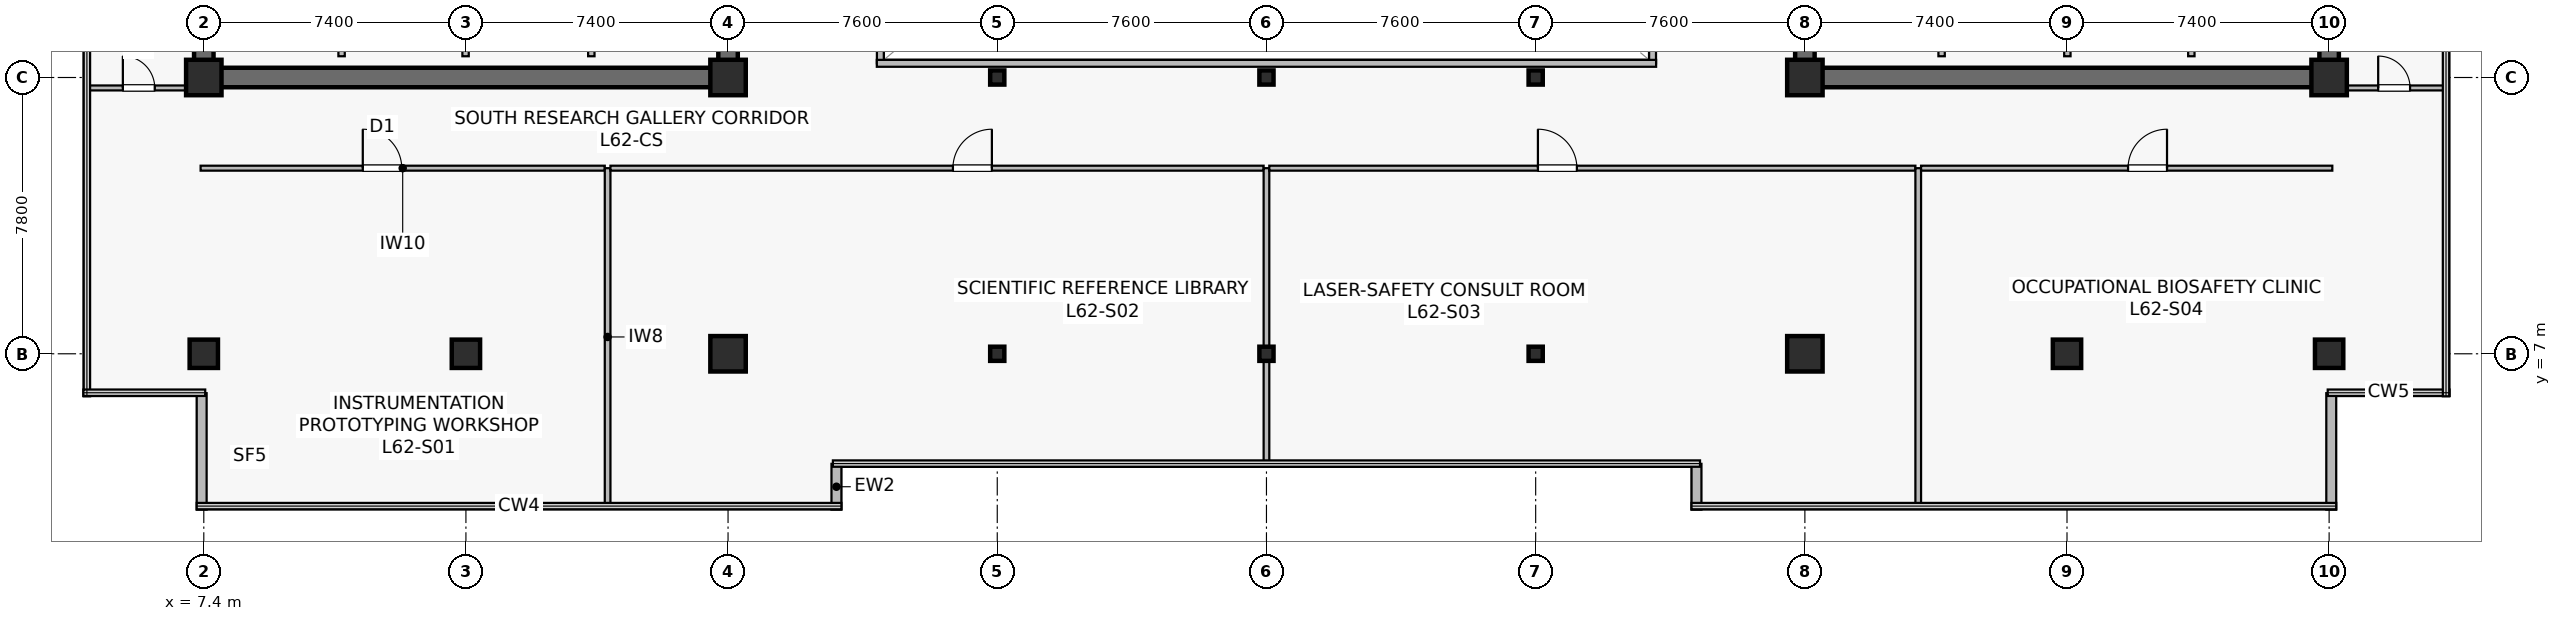
"""IFC4 building model, lengths in metres.
Left out: names, types, materials, properties, quantities, classifications, styles, units other than length and angle.
Written with IfcOpenShell. Run it as: python <this file> out.ifc"""

import sys

from ifc_helpers import new_model, si_unit, direction, frame, frame_2d, origin, origin_2d, place, context, subcontext, project, spatial, rectangle, hollow_rectangle, extrude, source, transform, mapped, element, fill, save


model = new_model("IFC4")
c1 = context("Model", 3, precision=1e-05, world=origin(), true_north=direction((0.0, 1.0)))
c2 = subcontext(c1, "Body", "Model", "MODEL_VIEW")
j1 = project(units=[si_unit("LENGTHUNIT", "METRE"), si_unit("PLANEANGLEUNIT", "RADIAN")], contexts=[c1])
p1 = place(None, origin())
s1 = spatial("IfcSite", under=j1, at=p1, CompositionType="ELEMENT")
p2 = place(p1, origin())
s2 = spatial("IfcBuilding", under=s1, at=p2, CompositionType="ELEMENT")
p3 = place(p2, frame((0.0, 0.0, 258.8)))
s3 = spatial("IfcBuildingStorey", under=s2, at=p3, CompositionType="ELEMENT", Elevation=258.8)
p4 = place(p3, frame((7.125, 14.8, 0.0), z_axis=(0.0, 0.0, 1.0), x_axis=(1.0, 0.0, 0.0)))
e1 = element("IfcWall", 1, at=p4, inside=s3, PredefinedType="SHEAR", context=c2, shape_type="SweptSolid", body=[
    extrude(rectangle(XDim=15.35, YDim=0.55, at=frame_2d((7.675, 0.0))), origin(), (0.0, 0.0, 1.0), 3.8),
])
p5 = place(p3, frame((7.4, 15.075, 0.0), z_axis=(0.0, 0.0, 1.0), x_axis=(0.0, 1.0, 0.0)))
e2 = element("IfcWall", 2, at=p5, inside=s3, PredefinedType="SHEAR", context=c2, shape_type="SweptSolid", body=[
    extrude(rectangle(XDim=18.45, YDim=0.55, at=frame_2d((9.225, 0.0))), origin(), (0.0, 0.0, 1.0), 3.8),
])
p6 = place(p3, frame((22.2, 15.075, 0.0), z_axis=(0.0, 0.0, 1.0), x_axis=(0.0, 1.0, 0.0)))
e3 = element("IfcWall", 3, at=p6, inside=s3, PredefinedType="SHEAR", context=c2, shape_type="SweptSolid", body=[
    extrude(rectangle(XDim=18.45, YDim=0.55, at=frame_2d((9.225, 0.0))), origin(), (0.0, 0.0, 1.0), 3.8),
])
p7 = place(p6, frame((3.475, 0.0, 0.0)))
e4 = element("IfcOpeningElement", 4, at=p7, cuts=e3, PredefinedType="OPENING", context=c2, shape_type="SweptSolid", body=[
    extrude(rectangle(XDim=1.42, YDim=2.2, at=frame_2d((0.71, 1.1))), frame((0.0, 0.285, 0.0), z_axis=(0.0, -1.0, 0.0), x_axis=(1.0, 0.0, 0.0)), (0.0, 0.0, 1.0), 0.57),
])
p8 = place(p3, frame((52.325, 14.8, 0.0), z_axis=(0.0, 0.0, 1.0), x_axis=(1.0, 0.0, 0.0)))
e5 = element("IfcWall", 5, at=p8, inside=s3, PredefinedType="SHEAR", context=c2, shape_type="SweptSolid", body=[
    extrude(rectangle(XDim=15.35, YDim=0.55, at=frame_2d((7.675, 0.0))), origin(), (0.0, 0.0, 1.0), 3.8),
])
p9 = place(p3, frame((52.6, 15.075, 0.0), z_axis=(0.0, 0.0, 1.0), x_axis=(0.0, 1.0, 0.0)))
e6 = element("IfcWall", 6, at=p9, inside=s3, PredefinedType="SHEAR", context=c2, shape_type="SweptSolid", body=[
    extrude(rectangle(XDim=18.45, YDim=0.55, at=frame_2d((9.225, 0.0))), origin(), (0.0, 0.0, 1.0), 3.8),
])
p10 = place(p9, frame((3.475, 0.0, 0.0)))
e7 = element("IfcOpeningElement", 7, at=p10, cuts=e6, PredefinedType="OPENING", context=c2, shape_type="SweptSolid", body=[
    extrude(rectangle(XDim=1.42, YDim=2.2, at=frame_2d((0.71, 1.1))), frame((0.0, 0.285, 0.0), z_axis=(0.0, -1.0, 0.0), x_axis=(1.0, 0.0, 0.0)), (0.0, 0.0, 1.0), 0.57),
])
p11 = place(p3, frame((67.4, 15.075, 0.0), z_axis=(0.0, 0.0, 1.0), x_axis=(0.0, 1.0, 0.0)))
e8 = element("IfcWall", 8, at=p11, inside=s3, PredefinedType="SHEAR", context=c2, shape_type="SweptSolid", body=[
    extrude(rectangle(XDim=18.45, YDim=0.55, at=frame_2d((9.225, 0.0))), origin(), (0.0, 0.0, 1.0), 3.8),
])
m1 = source(origin(), c2, "Body", "SweptSolid", [
    extrude(rectangle(XDim=0.8, YDim=0.8, at=origin_2d()), origin(), (0.0, 0.0, 1.0), 4.1),
])
p12 = place(p3, frame((14.8, 7.0, 0.0), z_axis=(0.0, 0.0, 1.0), x_axis=(1.0, 0.0, 0.0)))
e9 = element("IfcColumn", 9, at=p12, inside=s3, PredefinedType="COLUMN", context=c2, shape_type="MappedRepresentation", body=[
    mapped(m1, transform((0.0, 0.0, 0.0), scale=1.0)),
])
m2 = source(origin(), c2, "Body", "SweptSolid", [
    extrude(rectangle(XDim=1.0, YDim=1.0, at=origin_2d()), origin(), (0.0, 0.0, 1.0), 4.1),
])
for number, where, z_axis, x_axis in (
    (10, (22.2, 7.0, 0.0), (0.0, 0.0, 1.0), (1.0, 0.0, 0.0)),
    (11, (7.4, 14.8, 0.0), (0.0, 0.0, 1.0), (1.0, 0.0, 0.0)),
    (12, (22.2, 14.8, 0.0), (0.0, 0.0, 1.0), (1.0, 0.0, 0.0)),
    (13, (52.6, 7.0, 0.0), (0.0, 0.0, 1.0), (1.0, 0.0, 0.0)),
):
    element("IfcColumn", number, at=place(p3, frame(where, z_axis=z_axis, x_axis=x_axis)), inside=s3, PredefinedType="COLUMN", context=c2, shape_type="MappedRepresentation", body=[
        mapped(m2, transform((0.0, 0.0, 0.0), scale=1.0)),
    ])
p13 = place(p3, frame((60.0, 7.0, 0.0), z_axis=(0.0, 0.0, 1.0), x_axis=(1.0, 0.0, 0.0)))
e14 = element("IfcColumn", 14, at=p13, inside=s3, PredefinedType="COLUMN", context=c2, shape_type="MappedRepresentation", body=[
    mapped(m1, transform((0.0, 0.0, 0.0), scale=1.0)),
])
for number, where, z_axis, x_axis in (
    (15, (52.6, 14.8, 0.0), (0.0, 0.0, 1.0), (1.0, 0.0, 0.0)),
    (16, (67.4, 14.8, 0.0), (0.0, 0.0, 1.0), (1.0, 0.0, 0.0)),
):
    element("IfcColumn", number, at=place(p3, frame(where, z_axis=z_axis, x_axis=x_axis)), inside=s3, PredefinedType="COLUMN", context=c2, shape_type="MappedRepresentation", body=[
        mapped(m2, transform((0.0, 0.0, 0.0), scale=1.0)),
    ])
for number, where, z_axis, x_axis in (
    (17, (7.4, 7.0, 0.0), (0.0, 0.0, 1.0), (1.0, 0.0, 0.0)),
    (18, (67.4, 7.0, 0.0), (0.0, 0.0, 1.0), (1.0, 0.0, 0.0)),
):
    element("IfcColumn", number, at=place(p3, frame(where, z_axis=z_axis, x_axis=x_axis)), inside=s3, PredefinedType="COLUMN", context=c2, shape_type="MappedRepresentation", body=[
        mapped(m1, transform((0.0, 0.0, 0.0), scale=1.0)),
    ])
m3 = source(origin(), c2, "Body", "SweptSolid", [
    extrude(hollow_rectangle(XDim=0.4, YDim=0.4, WallThickness=0.019, at=origin_2d()), origin(), (0.0, 0.0, 1.0), 4.1),
])
for number, where, z_axis, x_axis in (
    (19, (29.8, 7.0, 0.0), (0.0, 0.0, 1.0), (1.0, 0.0, 0.0)),
    (20, (29.8, 14.8, 0.0), (0.0, 0.0, 1.0), (1.0, 0.0, 0.0)),
    (21, (37.4, 7.0, 0.0), (0.0, 0.0, 1.0), (1.0, 0.0, 0.0)),
    (22, (37.4, 14.8, 0.0), (0.0, 0.0, 1.0), (1.0, 0.0, 0.0)),
    (23, (45.0, 7.0, 0.0), (0.0, 0.0, 1.0), (1.0, 0.0, 0.0)),
    (24, (45.0, 14.8, 0.0), (0.0, 0.0, 1.0), (1.0, 0.0, 0.0)),
):
    element("IfcColumn", number, at=place(p3, frame(where, z_axis=z_axis, x_axis=x_axis)), inside=s3, PredefinedType="COLUMN", context=c2, shape_type="MappedRepresentation", body=[
        mapped(m3, transform((0.0, 0.0, 0.0), scale=1.0)),
    ])
for number, where, z_axis, x_axis in (
    (25, (25.26, 2.6, 0.0), (0.0, 0.0, 1.0), (0.0, 1.0, 0.0)),
    (26, (49.54, 3.893, 0.0), (0.0, 0.0, 1.0), (0.0, -1.0, 0.0)),
):
    element("IfcWall", number, at=place(p3, frame(where, z_axis=z_axis, x_axis=x_axis)), inside=s3, PredefinedType="STANDARD", context=c2, shape_type="SweptSolid", body=[
        extrude(rectangle(XDim=1.293, YDim=0.28, at=frame_2d((0.646, 0.0))), origin(), (0.0, 0.0, 1.0), 3.8),
    ])
for number, where, z_axis, x_axis in (
    (27, (67.46, 2.6, 0.0), (0.0, 0.0, 1.0), (0.0, 1.0, 0.0)),
    (28, (7.34, 5.888, 0.0), (0.0, 0.0, 1.0), (0.0, -1.0, 0.0)),
):
    element("IfcWall", number, at=place(p3, frame(where, z_axis=z_axis, x_axis=x_axis)), inside=s3, PredefinedType="STANDARD", context=c2, shape_type="SweptSolid", body=[
        extrude(rectangle(XDim=3.288, YDim=0.28, at=frame_2d((1.644, 0.0))), origin(), (0.0, 0.0, 1.0), 3.8),
    ])
p14 = place(p3, frame((11.29, 15.4, 0.0), z_axis=(0.0, 0.0, 1.0), x_axis=(0.0, 1.0, 0.0)))
e29 = element("IfcWall", 29, at=p14, inside=s3, PredefinedType="SOLIDWALL", context=c2, shape_type="SweptSolid", body=[
    extrude(rectangle(XDim=2.4, YDim=0.18, at=frame_2d((1.2, 0.0))), origin(), (0.0, 0.0, 1.0), 3.8),
])
p15 = place(p3, frame((14.79, 15.4, 0.0), z_axis=(0.0, 0.0, 1.0), x_axis=(0.0, 1.0, 0.0)))
e30 = element("IfcWall", 30, at=p15, inside=s3, PredefinedType="SOLIDWALL", context=c2, shape_type="SweptSolid", body=[
    extrude(rectangle(XDim=2.4, YDim=0.18, at=frame_2d((1.2, 0.0))), origin(), (0.0, 0.0, 1.0), 3.197),
])
for number, where, z_axis, x_axis in (
    (31, (18.34, 15.4, 0.0), (0.0, 0.0, 1.0), (0.0, 1.0, 0.0)),
    (32, (63.51, 15.4, 0.0), (0.0, 0.0, 1.0), (0.0, 1.0, 0.0)),
):
    element("IfcWall", number, at=place(p3, frame(where, z_axis=z_axis, x_axis=x_axis)), inside=s3, PredefinedType="SOLIDWALL", context=c2, shape_type="SweptSolid", body=[
        extrude(rectangle(XDim=2.4, YDim=0.18, at=frame_2d((1.2, 0.0))), origin(), (0.0, 0.0, 1.0), 3.8),
    ])
p16 = place(p3, frame((60.01, 15.4, 0.0), z_axis=(0.0, 0.0, 1.0), x_axis=(0.0, 1.0, 0.0)))
e33 = element("IfcWall", 33, at=p16, inside=s3, PredefinedType="SOLIDWALL", context=c2, shape_type="SweptSolid", body=[
    extrude(rectangle(XDim=2.4, YDim=0.18, at=frame_2d((1.2, 0.0))), origin(), (0.0, 0.0, 1.0), 3.197),
])
p17 = place(p3, frame((56.46, 15.4, 0.0), z_axis=(0.0, 0.0, 1.0), x_axis=(0.0, 1.0, 0.0)))
e34 = element("IfcWall", 34, at=p17, inside=s3, PredefinedType="SOLIDWALL", context=c2, shape_type="SweptSolid", body=[
    extrude(rectangle(XDim=2.4, YDim=0.18, at=frame_2d((1.2, 0.0))), origin(), (0.0, 0.0, 1.0), 3.8),
])
p18 = place(p3, frame((26.5, 15.2, 0.0), z_axis=(0.0, 0.0, 1.0), x_axis=(0.0, 1.0, 0.0)))
e35 = element("IfcWall", 35, at=p18, inside=s3, PredefinedType="SOLIDWALL", context=c2, shape_type="SweptSolid", body=[
    extrude(rectangle(XDim=18.2, YDim=0.195, at=frame_2d((9.1, 0.0))), origin(), (0.0, 0.0, 1.0), 3.8),
])
p19 = place(p18, frame((1.8, 0.0, 0.9)))
e36 = element("IfcOpeningElement", 36, at=p19, cuts=e35, PredefinedType="OPENING", context=c2, shape_type="SweptSolid", body=[
    extrude(rectangle(XDim=1.5, YDim=1.4, at=frame_2d((0.75, 0.7))), frame((0.0, 0.107, 0.0), z_axis=(0.0, -1.0, 0.0), x_axis=(1.0, 0.0, 0.0)), (0.0, 0.0, 1.0), 0.215),
])
p20 = place(p18, frame((13.2, 0.0, 0.9)))
e37 = element("IfcOpeningElement", 37, at=p20, cuts=e35, PredefinedType="OPENING", context=c2, shape_type="SweptSolid", body=[
    extrude(rectangle(XDim=1.5, YDim=1.4, at=frame_2d((0.75, 0.7))), frame((0.0, 0.107, 0.0), z_axis=(0.0, -1.0, 0.0), x_axis=(1.0, 0.0, 0.0)), (0.0, 0.0, 1.0), 0.215),
])
p21 = place(p3, frame((48.3, 15.2, 0.0), z_axis=(0.0, 0.0, 1.0), x_axis=(0.0, 1.0, 0.0)))
e38 = element("IfcWall", 38, at=p21, inside=s3, PredefinedType="SOLIDWALL", context=c2, shape_type="SweptSolid", body=[
    extrude(rectangle(XDim=18.2, YDim=0.195, at=frame_2d((9.1, 0.0))), origin(), (0.0, 0.0, 1.0), 3.8),
])
p22 = place(p21, frame((1.8, 0.0, 0.9)))
e39 = element("IfcOpeningElement", 39, at=p22, cuts=e38, PredefinedType="OPENING", context=c2, shape_type="SweptSolid", body=[
    extrude(rectangle(XDim=1.5, YDim=1.4, at=frame_2d((0.75, 0.7))), frame((0.0, 0.107, 0.0), z_axis=(0.0, -1.0, 0.0), x_axis=(1.0, 0.0, 0.0)), (0.0, 0.0, 1.0), 0.215),
])
p23 = place(p21, frame((13.2, 0.0, 0.9)))
e40 = element("IfcOpeningElement", 40, at=p23, cuts=e38, PredefinedType="OPENING", context=c2, shape_type="SweptSolid", body=[
    extrude(rectangle(XDim=1.5, YDim=1.4, at=frame_2d((0.75, 0.7))), frame((0.0, 0.107, 0.0), z_axis=(0.0, -1.0, 0.0), x_axis=(1.0, 0.0, 0.0)), (0.0, 0.0, 1.0), 0.215),
])
p24 = place(p3, frame((26.4, 15.2, 0.0), z_axis=(0.0, 0.0, 1.0), x_axis=(1.0, 0.0, 0.0)))
e41 = element("IfcWall", 41, at=p24, inside=s3, PredefinedType="SOLIDWALL", context=c2, shape_type="SweptSolid", body=[
    extrude(rectangle(XDim=22.0, YDim=0.195, at=frame_2d((11.0, 0.0))), origin(), (0.0, 0.0, 1.0), 3.8),
])
p25 = place(p3, frame((7.31, 12.24, 0.0), z_axis=(0.0, 0.0, 1.0), x_axis=(1.0, 0.0, 0.0)))
e42 = element("IfcWall", 42, at=p25, inside=s3, PredefinedType="PARTITIONING", context=c2, shape_type="SweptSolid", body=[
    extrude(rectangle(XDim=11.41, YDim=0.14, at=frame_2d((5.705, 0.0))), origin(), (0.0, 0.0, 1.0), 3.197),
])
p26 = place(p25, frame((4.578, 0.0, 0.0)))
e43 = element("IfcOpeningElement", 43, at=p26, cuts=e42, PredefinedType="OPENING", context=c2, shape_type="SweptSolid", body=[
    extrude(rectangle(XDim=1.1, YDim=2.18, at=frame_2d((0.55, 1.09))), frame((0.0, 0.08, 0.0), z_axis=(0.0, -1.0, 0.0), x_axis=(1.0, 0.0, 0.0)), (0.0, 0.0, 1.0), 0.16),
])
p27 = place(p3, frame((18.8, 2.71, 0.0), z_axis=(0.0, 0.0, 1.0), x_axis=(0.0, 1.0, 0.0)))
e44 = element("IfcWall", 44, at=p27, inside=s3, PredefinedType="PARTITIONING", context=c2, shape_type="SweptSolid", body=[
    extrude(rectangle(XDim=9.53, YDim=0.16, at=frame_2d((4.765, 0.0))), origin(), (0.0, 0.0, 1.0), 3.135),
])
p28 = place(p3, frame((18.88, 12.24, 0.0), z_axis=(0.0, 0.0, 1.0), x_axis=(1.0, 0.0, 0.0)))
e45 = element("IfcWall", 45, at=p28, inside=s3, PredefinedType="PARTITIONING", context=c2, shape_type="SweptSolid", body=[
    extrude(rectangle(XDim=18.44, YDim=0.14, at=frame_2d((9.22, 0.0))), origin(), (0.0, 0.0, 1.0), 3.197),
])
p29 = place(p28, frame((9.668, 0.0, 0.0)))
e46 = element("IfcOpeningElement", 46, at=p29, cuts=e45, PredefinedType="OPENING", context=c2, shape_type="SweptSolid", body=[
    extrude(rectangle(XDim=1.1, YDim=2.18, at=frame_2d((0.55, 1.09))), frame((0.0, 0.08, 0.0), z_axis=(0.0, -1.0, 0.0), x_axis=(1.0, 0.0, 0.0)), (0.0, 0.0, 1.0), 0.16),
])
p30 = place(p3, frame((37.4, 3.91, 0.0), z_axis=(0.0, 0.0, 1.0), x_axis=(0.0, 1.0, 0.0)))
e47 = element("IfcWall", 47, at=p30, inside=s3, PredefinedType="PARTITIONING", context=c2, shape_type="SweptSolid", body=[
    extrude(rectangle(XDim=8.33, YDim=0.16, at=frame_2d((4.165, 0.0))), origin(), (0.0, 0.0, 1.0), 3.135),
])
p31 = place(p3, frame((37.48, 12.24, 0.0), z_axis=(0.0, 0.0, 1.0), x_axis=(1.0, 0.0, 0.0)))
e48 = element("IfcWall", 48, at=p31, inside=s3, PredefinedType="PARTITIONING", context=c2, shape_type="SweptSolid", body=[
    extrude(rectangle(XDim=18.24, YDim=0.14, at=frame_2d((9.12, 0.0))), origin(), (0.0, 0.0, 1.0), 3.197),
])
p32 = place(p31, frame((7.583, 0.0, 0.0)))
e49 = element("IfcOpeningElement", 49, at=p32, cuts=e48, PredefinedType="OPENING", context=c2, shape_type="SweptSolid", body=[
    extrude(rectangle(XDim=1.1, YDim=2.18, at=frame_2d((0.55, 1.09))), frame((0.0, 0.08, 0.0), z_axis=(0.0, -1.0, 0.0), x_axis=(1.0, 0.0, 0.0)), (0.0, 0.0, 1.0), 0.16),
])
p33 = place(p3, frame((55.8, 2.71, 0.0), z_axis=(0.0, 0.0, 1.0), x_axis=(0.0, 1.0, 0.0)))
e50 = element("IfcWall", 50, at=p33, inside=s3, PredefinedType="PARTITIONING", context=c2, shape_type="SweptSolid", body=[
    extrude(rectangle(XDim=9.53, YDim=0.16, at=frame_2d((4.765, 0.0))), origin(), (0.0, 0.0, 1.0), 3.135),
])
p34 = place(p3, frame((55.88, 12.24, 0.0), z_axis=(0.0, 0.0, 1.0), x_axis=(1.0, 0.0, 0.0)))
e51 = element("IfcWall", 51, at=p34, inside=s3, PredefinedType="PARTITIONING", context=c2, shape_type="SweptSolid", body=[
    extrude(rectangle(XDim=11.61, YDim=0.14, at=frame_2d((5.805, 0.0))), origin(), (0.0, 0.0, 1.0), 3.197),
])
p35 = place(p34, frame((5.844, 0.0, 0.0)))
e52 = element("IfcOpeningElement", 52, at=p35, cuts=e51, PredefinedType="OPENING", context=c2, shape_type="SweptSolid", body=[
    extrude(rectangle(XDim=1.1, YDim=2.18, at=frame_2d((0.55, 1.09))), frame((0.0, 0.08, 0.0), z_axis=(0.0, -1.0, 0.0), x_axis=(1.0, 0.0, 0.0)), (0.0, 0.0, 1.0), 0.16),
])
p36 = place(p3, frame((4.11, 14.505, 0.0), z_axis=(0.0, 0.0, 1.0), x_axis=(1.0, 0.0, 0.0)))
e53 = element("IfcWall", 53, at=p36, inside=s3, PredefinedType="PARTITIONING", context=c2, shape_type="SweptSolid", body=[
    extrude(rectangle(XDim=2.91, YDim=0.14, at=frame_2d((1.455, 0.0))), origin(), (0.0, 0.0, 1.0), 3.8),
])
p37 = place(p36, frame((1.005, 0.0, 0.0)))
e54 = element("IfcOpeningElement", 54, at=p37, cuts=e53, PredefinedType="OPENING", context=c2, shape_type="SweptSolid", body=[
    extrude(rectangle(XDim=0.9, YDim=2.1, at=frame_2d((0.45, 1.05))), frame((0.0, 0.08, 0.0), z_axis=(0.0, -1.0, 0.0), x_axis=(1.0, 0.0, 0.0)), (0.0, 0.0, 1.0), 0.16),
])
p38 = place(p3, frame((67.78, 14.505, 0.0), z_axis=(0.0, 0.0, 1.0), x_axis=(1.0, 0.0, 0.0)))
e55 = element("IfcWall", 55, at=p38, inside=s3, PredefinedType="PARTITIONING", context=c2, shape_type="SweptSolid", body=[
    extrude(rectangle(XDim=2.91, YDim=0.14, at=frame_2d((1.455, 0.0))), origin(), (0.0, 0.0, 1.0), 3.8),
])
p39 = place(p38, frame((1.005, 0.0, 0.0)))
e56 = element("IfcOpeningElement", 56, at=p39, cuts=e55, PredefinedType="OPENING", context=c2, shape_type="SweptSolid", body=[
    extrude(rectangle(XDim=0.9, YDim=2.1, at=frame_2d((0.45, 1.05))), frame((0.0, 0.08, 0.0), z_axis=(0.0, -1.0, 0.0), x_axis=(1.0, 0.0, 0.0)), (0.0, 0.0, 1.0), 0.16),
])
m4 = source(origin(), c2, "Body", "SweptSolid", [
    extrude(rectangle(XDim=1.1, YDim=2.18, at=frame_2d((0.55, 1.09))), frame((0.0, 0.025, 0.0), z_axis=(0.0, -1.0, 0.0), x_axis=(1.0, 0.0, 0.0)), (0.0, 0.0, 1.0), 0.05),
])
p40 = place(p26, origin())
e57 = element("IfcDoor", 57, at=p40, inside=s3, OperationType="SINGLE_SWING_LEFT", PredefinedType="DOOR", context=c2, shape_type="MappedRepresentation", body=[
    mapped(m4, transform((0.0, 0.0, 0.0), scale=1.0)),
])
fill(e43, e57)
p41 = place(p29, origin())
e58 = element("IfcDoor", 58, at=p41, inside=s3, OperationType="SINGLE_SWING_RIGHT", PredefinedType="DOOR", context=c2, shape_type="MappedRepresentation", body=[
    mapped(m4, transform((0.0, 0.0, 0.0), scale=1.0)),
])
fill(e46, e58)
p42 = place(p32, origin())
e59 = element("IfcDoor", 59, at=p42, inside=s3, OperationType="SINGLE_SWING_LEFT", PredefinedType="DOOR", context=c2, shape_type="MappedRepresentation", body=[
    mapped(m4, transform((0.0, 0.0, 0.0), scale=1.0)),
])
fill(e49, e59)
p43 = place(p35, origin())
e60 = element("IfcDoor", 60, at=p43, inside=s3, OperationType="SINGLE_SWING_RIGHT", PredefinedType="DOOR", context=c2, shape_type="MappedRepresentation", body=[
    mapped(m4, transform((0.0, 0.0, 0.0), scale=1.0)),
])
fill(e52, e60)
m5 = source(origin(), c2, "Body", "SweptSolid", [
    extrude(rectangle(XDim=0.9, YDim=2.1, at=frame_2d((0.45, 1.05))), frame((0.0, 0.025, 0.0), z_axis=(0.0, -1.0, 0.0), x_axis=(1.0, 0.0, 0.0)), (0.0, 0.0, 1.0), 0.05),
])
p44 = place(p37, origin())
e61 = element("IfcDoor", 61, at=p44, inside=s3, OperationType="SINGLE_SWING_LEFT", PredefinedType="DOOR", context=c2, shape_type="MappedRepresentation", body=[
    mapped(m5, transform((0.0, 0.0, 0.0), scale=1.0)),
])
fill(e54, e61)
p45 = place(p39, origin())
e62 = element("IfcDoor", 62, at=p45, inside=s3, OperationType="SINGLE_SWING_LEFT", PredefinedType="DOOR", context=c2, shape_type="MappedRepresentation", body=[
    mapped(m5, transform((0.0, 0.0, 0.0), scale=1.0)),
])
fill(e56, e62)
save(model, sys.argv[1])
